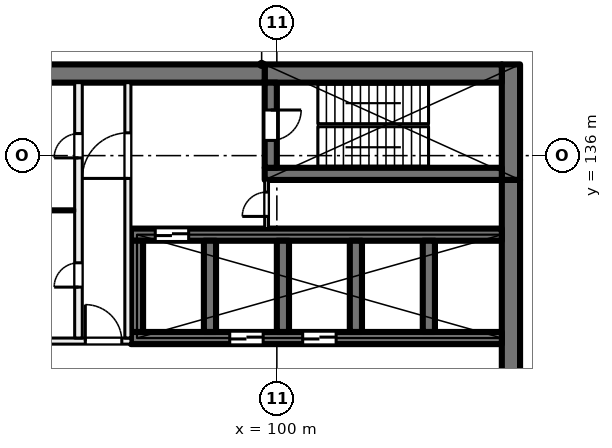
"""IFC4 building model, lengths in metres.
Left out: names, types, materials, properties, quantities, classifications, styles, units other than length and angle.
Written with IfcOpenShell. Run it as: python <this file> out.ifc"""

import sys

from ifc_helpers import new_model, si_unit, direction, frame, frame_2d, origin, place, context, subcontext, project, spatial, rectangle, extrude, element, fill, save


model = new_model("IFC4")
c1 = context("Model", 3, precision=1e-05, world=origin(), true_north=direction((0.0, 1.0)))
c2 = subcontext(c1, "Body", "Model", "MODEL_VIEW")
j1 = project(units=[si_unit("LENGTHUNIT", "METRE"), si_unit("PLANEANGLEUNIT", "RADIAN")], contexts=[c1])
p1 = place(None, origin())
s1 = spatial("IfcSite", under=j1, at=p1, CompositionType="ELEMENT")
p2 = place(p1, origin())
s2 = spatial("IfcBuilding", under=s1, at=p2, CompositionType="ELEMENT")
p3 = place(p2, frame((0.0, 0.0, 7.5)))
s3 = spatial("IfcBuildingStorey", under=s2, at=p3, CompositionType="ELEMENT", Elevation=7.5)
p4 = place(p3, frame((107.7, 139.0, 0.0), z_axis=(0.0, 0.0, 1.0), x_axis=(0.0, -1.0, 0.0)))
e1 = element("IfcWall", 1, at=p4, inside=s3, PredefinedType="SHEAR", context=c2, shape_type="SweptSolid", body=[
    extrude(rectangle(XDim=3.8, YDim=0.6, at=frame_2d((1.9, 0.0))), origin(), (0.0, 0.0, 1.0), 5.0),
])
p5 = place(p3, frame((107.7, 135.2, 0.0), z_axis=(0.0, 0.0, 1.0), x_axis=(0.0, -1.0, 0.0)))
e2 = element("IfcWall", 2, at=p5, inside=s3, PredefinedType="SHEAR", context=c2, shape_type="SweptSolid", body=[
    extrude(rectangle(XDim=14.4, YDim=0.6, at=frame_2d((7.2, 0.0))), origin(), (0.0, 0.0, 1.0), 5.0),
])
p6 = place(p3, frame((107.4, 138.7, 0.0), z_axis=(0.0, 0.0, 1.0), x_axis=(-1.0, 0.0, 0.0)))
e3 = element("IfcWall", 3, at=p6, inside=s3, PredefinedType="SHEAR", context=c2, shape_type="SweptSolid", body=[
    extrude(rectangle(XDim=7.8, YDim=0.6, at=frame_2d((3.9, 0.0))), origin(), (0.0, 0.0, 1.0), 5.0),
])
p7 = place(p3, frame((99.6, 138.7, 0.0), z_axis=(0.0, 0.0, 1.0), x_axis=(-1.0, 0.0, 0.0)))
e4 = element("IfcWall", 4, at=p7, inside=s3, PredefinedType="SHEAR", context=c2, shape_type="SweptSolid", body=[
    extrude(rectangle(XDim=8.9, YDim=0.6, at=frame_2d((4.45, 0.0))), origin(), (0.0, 0.0, 1.0), 5.0),
])
p8 = place(p3, frame((107.4, 135.4, 0.0), z_axis=(0.0, 0.0, 1.0), x_axis=(-1.0, 0.0, 0.0)))
e5 = element("IfcWall", 5, at=p8, inside=s3, PredefinedType="SHEAR", context=c2, shape_type="SweptSolid", body=[
    extrude(rectangle(XDim=7.8, YDim=0.4, at=frame_2d((3.9, 0.0))), origin(), (0.0, 0.0, 1.0), 5.0),
])
p9 = place(p3, frame((99.8, 138.4, 0.0), z_axis=(0.0, 0.0, 1.0), x_axis=(0.0, -1.0, 0.0)))
e6 = element("IfcWall", 6, at=p9, inside=s3, PredefinedType="SHEAR", context=c2, shape_type="SweptSolid", body=[
    extrude(rectangle(XDim=2.8, YDim=0.4, at=frame_2d((1.4, 0.0))), origin(), (0.0, 0.0, 1.0), 5.0),
])
p10 = place(p9, frame((0.9, 0.0, 0.0)))
e7 = element("IfcOpeningElement", 7, at=p10, cuts=e6, PredefinedType="OPENING", context=c2, shape_type="SweptSolid", body=[
    extrude(rectangle(XDim=1.0, YDim=2.1, at=frame_2d((0.5, 1.05))), frame((0.0, 0.21, 0.0), z_axis=(0.0, -1.0, 0.0), x_axis=(1.0, 0.0, 0.0)), (0.0, 0.0, 1.0), 0.42),
])
p11 = place(p3, frame((107.4, 130.0, 0.0), z_axis=(0.0, 0.0, 1.0), x_axis=(-1.0, 0.0, 0.0)))
e8 = element("IfcWall", 8, at=p11, inside=s3, PredefinedType="SHEAR", context=c2, shape_type="SweptSolid", body=[
    extrude(rectangle(XDim=12.2, YDim=0.4, at=frame_2d((6.1, 0.0))), origin(), (0.0, 0.0, 1.0), 5.0),
])
p12 = place(p11, frame((5.45, 0.0, 0.0)))
e9 = element("IfcOpeningElement", 9, at=p12, cuts=e8, PredefinedType="OPENING", context=c2, shape_type="SweptSolid", body=[
    extrude(rectangle(XDim=1.1, YDim=2.1, at=frame_2d((0.55, 1.05))), frame((0.0, 0.21, 0.0), z_axis=(0.0, -1.0, 0.0), x_axis=(1.0, 0.0, 0.0)), (0.0, 0.0, 1.0), 0.42),
])
p13 = place(p11, frame((7.85, 0.0, 0.0)))
e10 = element("IfcOpeningElement", 10, at=p13, cuts=e8, PredefinedType="OPENING", context=c2, shape_type="SweptSolid", body=[
    extrude(rectangle(XDim=1.1, YDim=2.1, at=frame_2d((0.55, 1.05))), frame((0.0, 0.21, 0.0), z_axis=(0.0, -1.0, 0.0), x_axis=(1.0, 0.0, 0.0)), (0.0, 0.0, 1.0), 0.42),
])
p14 = place(p3, frame((107.4, 133.4, 0.0), z_axis=(0.0, 0.0, 1.0), x_axis=(-1.0, 0.0, 0.0)))
e11 = element("IfcWall", 11, at=p14, inside=s3, PredefinedType="SHEAR", context=c2, shape_type="SweptSolid", body=[
    extrude(rectangle(XDim=12.2, YDim=0.4, at=frame_2d((6.1, 0.0))), origin(), (0.0, 0.0, 1.0), 5.0),
])
p15 = place(p14, frame((10.3, 0.0, 0.0)))
e12 = element("IfcOpeningElement", 12, at=p15, cuts=e11, PredefinedType="OPENING", context=c2, shape_type="SweptSolid", body=[
    extrude(rectangle(XDim=1.1, YDim=2.1, at=frame_2d((0.55, 1.05))), frame((0.0, 0.21, 0.0), z_axis=(0.0, -1.0, 0.0), x_axis=(1.0, 0.0, 0.0)), (0.0, 0.0, 1.0), 0.42),
])
for number, where, z_axis, x_axis in (
    (13, (105.0, 133.2, 0.0), (0.0, 0.0, 1.0), (0.0, -1.0, 0.0)),
    (14, (102.6, 133.2, 0.0), (0.0, 0.0, 1.0), (0.0, -1.0, 0.0)),
    (15, (100.2, 133.2, 0.0), (0.0, 0.0, 1.0), (0.0, -1.0, 0.0)),
    (16, (97.8, 133.2, 0.0), (0.0, 0.0, 1.0), (0.0, -1.0, 0.0)),
    (17, (95.4, 133.2, 0.0), (0.0, 0.0, 1.0), (0.0, -1.0, 0.0)),
):
    element("IfcWall", number, at=place(p3, frame(where, z_axis=z_axis, x_axis=x_axis)), inside=s3, PredefinedType="SHEAR", context=c2, shape_type="SweptSolid", body=[
        extrude(rectangle(XDim=3.0, YDim=0.4, at=frame_2d((1.5, 0.0))), origin(), (0.0, 0.0, 1.0), 5.0),
    ])
p16 = place(p3, frame((91.4, 129.9, 0.0), z_axis=(0.0, 0.0, 1.0), x_axis=(1.0, 0.0, 0.0)))
e18 = element("IfcWall", 18, at=p16, inside=s3, PredefinedType="PARTITIONING", context=c2, shape_type="SweptSolid", body=[
    extrude(rectangle(XDim=3.8, YDim=0.2, at=frame_2d((1.9, 0.0))), origin(), (0.0, 0.0, 1.0), 4.6),
])
p17 = place(p16, frame((2.3, 0.0, 0.0)))
e19 = element("IfcOpeningElement", 19, at=p17, cuts=e18, PredefinedType="OPENING", context=c2, shape_type="SweptSolid", body=[
    extrude(rectangle(XDim=1.2, YDim=2.1, at=frame_2d((0.6, 1.05))), frame((0.0, 0.11, 0.0), z_axis=(0.0, -1.0, 0.0), x_axis=(1.0, 0.0, 0.0)), (0.0, 0.0, 1.0), 0.22),
])
p18 = place(p3, frame((95.1, 130.0, 0.0), z_axis=(0.0, 0.0, 1.0), x_axis=(0.0, 1.0, 0.0)))
e20 = element("IfcWall", 20, at=p18, inside=s3, PredefinedType="PARTITIONING", context=c2, shape_type="SweptSolid", body=[
    extrude(rectangle(XDim=8.4, YDim=0.2, at=frame_2d((4.2, 0.0))), origin(), (0.0, 0.0, 1.0), 4.6),
])
p19 = place(p18, frame((5.25, 0.0, 0.0)))
e21 = element("IfcOpeningElement", 21, at=p19, cuts=e20, PredefinedType="OPENING", context=c2, shape_type="SweptSolid", body=[
    extrude(rectangle(XDim=1.5, YDim=2.1, at=frame_2d((0.75, 1.05))), frame((0.0, 0.11, 0.0), z_axis=(0.0, -1.0, 0.0), x_axis=(1.0, 0.0, 0.0)), (0.0, 0.0, 1.0), 0.22),
])
p20 = place(p3, frame((93.475, 130.0, 0.0), z_axis=(0.0, 0.0, 1.0), x_axis=(0.0, 1.0, 0.0)))
e22 = element("IfcWall", 22, at=p20, inside=s3, PredefinedType="PARTITIONING", context=c2, shape_type="SweptSolid", body=[
    extrude(rectangle(XDim=8.4, YDim=0.25, at=frame_2d((4.2, 0.0))), origin(), (0.0, 0.0, 1.0), 4.6),
])
p21 = place(p20, frame((1.675, 0.0, 0.0)))
e23 = element("IfcOpeningElement", 23, at=p21, cuts=e22, PredefinedType="OPENING", context=c2, shape_type="SweptSolid", body=[
    extrude(rectangle(XDim=0.8, YDim=2.1, at=frame_2d((0.4, 1.05))), frame((0.0, 0.135, 0.0), z_axis=(0.0, -1.0, 0.0), x_axis=(1.0, 0.0, 0.0)), (0.0, 0.0, 1.0), 0.27),
])
p22 = place(p20, frame((5.925, 0.0, 0.0)))
e24 = element("IfcOpeningElement", 24, at=p22, cuts=e22, PredefinedType="OPENING", context=c2, shape_type="SweptSolid", body=[
    extrude(rectangle(XDim=0.8, YDim=2.1, at=frame_2d((0.4, 1.05))), frame((0.0, 0.135, 0.0), z_axis=(0.0, -1.0, 0.0), x_axis=(1.0, 0.0, 0.0)), (0.0, 0.0, 1.0), 0.27),
])
p23 = place(p3, frame((99.663, 133.6, 0.0), z_axis=(0.0, 0.0, 1.0), x_axis=(0.0, 1.0, 0.0)))
e25 = element("IfcWall", 25, at=p23, inside=s3, PredefinedType="PARTITIONING", context=c2, shape_type="SweptSolid", body=[
    extrude(rectangle(XDim=1.6, YDim=0.125, at=frame_2d((0.8, 0.0))), origin(), (0.0, 0.0, 1.0), 4.6),
])
p24 = place(p23, frame((0.4, 0.0, 0.0)))
e26 = element("IfcOpeningElement", 26, at=p24, cuts=e25, PredefinedType="OPENING", context=c2, shape_type="SweptSolid", body=[
    extrude(rectangle(XDim=0.8, YDim=2.1, at=frame_2d((0.4, 1.05))), frame((0.0, 0.073, 0.0), z_axis=(0.0, -1.0, 0.0), x_axis=(1.0, 0.0, 0.0)), (0.0, 0.0, 1.0), 0.145),
])
p25 = place(p3, frame((91.4, 134.2, 0.0), z_axis=(0.0, 0.0, 1.0), x_axis=(1.0, 0.0, 0.0)))
e27 = element("IfcWall", 27, at=p25, inside=s3, PredefinedType="PARTITIONING", context=c2, shape_type="SweptSolid", body=[
    extrude(rectangle(XDim=1.95, YDim=0.1, at=frame_2d((0.975, 0.0))), origin(), (0.0, 0.0, 1.0), 4.6),
])
p26 = place(p12, origin())
e28 = element("IfcDoor", 28, at=p26, inside=s3, OperationType="DOUBLE_DOOR_SLIDING", PredefinedType="DOOR", context=c2, shape_type="SweptSolid", body=[
    extrude(rectangle(XDim=1.1, YDim=2.1, at=frame_2d((0.55, 1.05))), frame((0.0, 0.025, 0.0), z_axis=(0.0, -1.0, 0.0), x_axis=(1.0, 0.0, 0.0)), (0.0, 0.0, 1.0), 0.05),
])
fill(e9, e28)
p27 = place(p13, origin())
e29 = element("IfcDoor", 29, at=p27, inside=s3, OperationType="DOUBLE_DOOR_SLIDING", PredefinedType="DOOR", context=c2, shape_type="SweptSolid", body=[
    extrude(rectangle(XDim=1.1, YDim=2.1, at=frame_2d((0.55, 1.05))), frame((0.0, 0.025, 0.0), z_axis=(0.0, -1.0, 0.0), x_axis=(1.0, 0.0, 0.0)), (0.0, 0.0, 1.0), 0.05),
])
fill(e10, e29)
p28 = place(p17, origin())
e30 = element("IfcDoor", 30, at=p28, inside=s3, OperationType="DOUBLE_DOOR_SINGLE_SWING", PredefinedType="DOOR", context=c2, shape_type="SweptSolid", body=[
    extrude(rectangle(XDim=1.2, YDim=2.1, at=frame_2d((0.6, 1.05))), frame((0.0, 0.025, 0.0), z_axis=(0.0, -1.0, 0.0), x_axis=(1.0, 0.0, 0.0)), (0.0, 0.0, 1.0), 0.05),
])
fill(e19, e30)
p29 = place(p19, origin())
e31 = element("IfcDoor", 31, at=p29, inside=s3, OperationType="DOUBLE_DOOR_SINGLE_SWING", PredefinedType="DOOR", context=c2, shape_type="SweptSolid", body=[
    extrude(rectangle(XDim=1.5, YDim=2.1, at=frame_2d((0.75, 1.05))), frame((0.0, 0.025, 0.0), z_axis=(0.0, -1.0, 0.0), x_axis=(1.0, 0.0, 0.0)), (0.0, 0.0, 1.0), 0.05),
])
fill(e21, e31)
p30 = place(p10, origin())
e32 = element("IfcDoor", 32, at=p30, inside=s3, OperationType="SINGLE_SWING_RIGHT", PredefinedType="DOOR", context=c2, shape_type="SweptSolid", body=[
    extrude(rectangle(XDim=1.0, YDim=2.1, at=frame_2d((0.5, 1.05))), frame((0.0, 0.025, 0.0), z_axis=(0.0, -1.0, 0.0), x_axis=(1.0, 0.0, 0.0)), (0.0, 0.0, 1.0), 0.05),
])
fill(e7, e32)
p31 = place(p24, origin())
e33 = element("IfcDoor", 33, at=p31, inside=s3, OperationType="SINGLE_SWING_LEFT", PredefinedType="DOOR", context=c2, shape_type="SweptSolid", body=[
    extrude(rectangle(XDim=0.8, YDim=2.1, at=frame_2d((0.4, 1.05))), frame((0.0, 0.025, 0.0), z_axis=(0.0, -1.0, 0.0), x_axis=(1.0, 0.0, 0.0)), (0.0, 0.0, 1.0), 0.05),
])
fill(e26, e33)
p32 = place(p21, origin())
e34 = element("IfcDoor", 34, at=p32, inside=s3, OperationType="SINGLE_SWING_RIGHT", PredefinedType="DOOR", context=c2, shape_type="SweptSolid", body=[
    extrude(rectangle(XDim=0.8, YDim=2.1, at=frame_2d((0.4, 1.05))), frame((0.0, 0.025, 0.0), z_axis=(0.0, -1.0, 0.0), x_axis=(1.0, 0.0, 0.0)), (0.0, 0.0, 1.0), 0.05),
])
fill(e23, e34)
p33 = place(p22, origin())
e35 = element("IfcDoor", 35, at=p33, inside=s3, OperationType="SINGLE_SWING_LEFT", PredefinedType="DOOR", context=c2, shape_type="SweptSolid", body=[
    extrude(rectangle(XDim=0.8, YDim=2.1, at=frame_2d((0.4, 1.05))), frame((0.0, 0.025, 0.0), z_axis=(0.0, -1.0, 0.0), x_axis=(1.0, 0.0, 0.0)), (0.0, 0.0, 1.0), 0.05),
])
fill(e24, e35)
p34 = place(p15, origin())
e36 = element("IfcDoor", 36, at=p34, inside=s3, OperationType="DOUBLE_DOOR_SLIDING", PredefinedType="DOOR", context=c2, shape_type="SweptSolid", body=[
    extrude(rectangle(XDim=1.1, YDim=2.1, at=frame_2d((0.55, 1.05))), frame((0.0, 0.025, 0.0), z_axis=(0.0, -1.0, 0.0), x_axis=(1.0, 0.0, 0.0)), (0.0, 0.0, 1.0), 0.05),
])
fill(e12, e36)
save(model, sys.argv[1])
